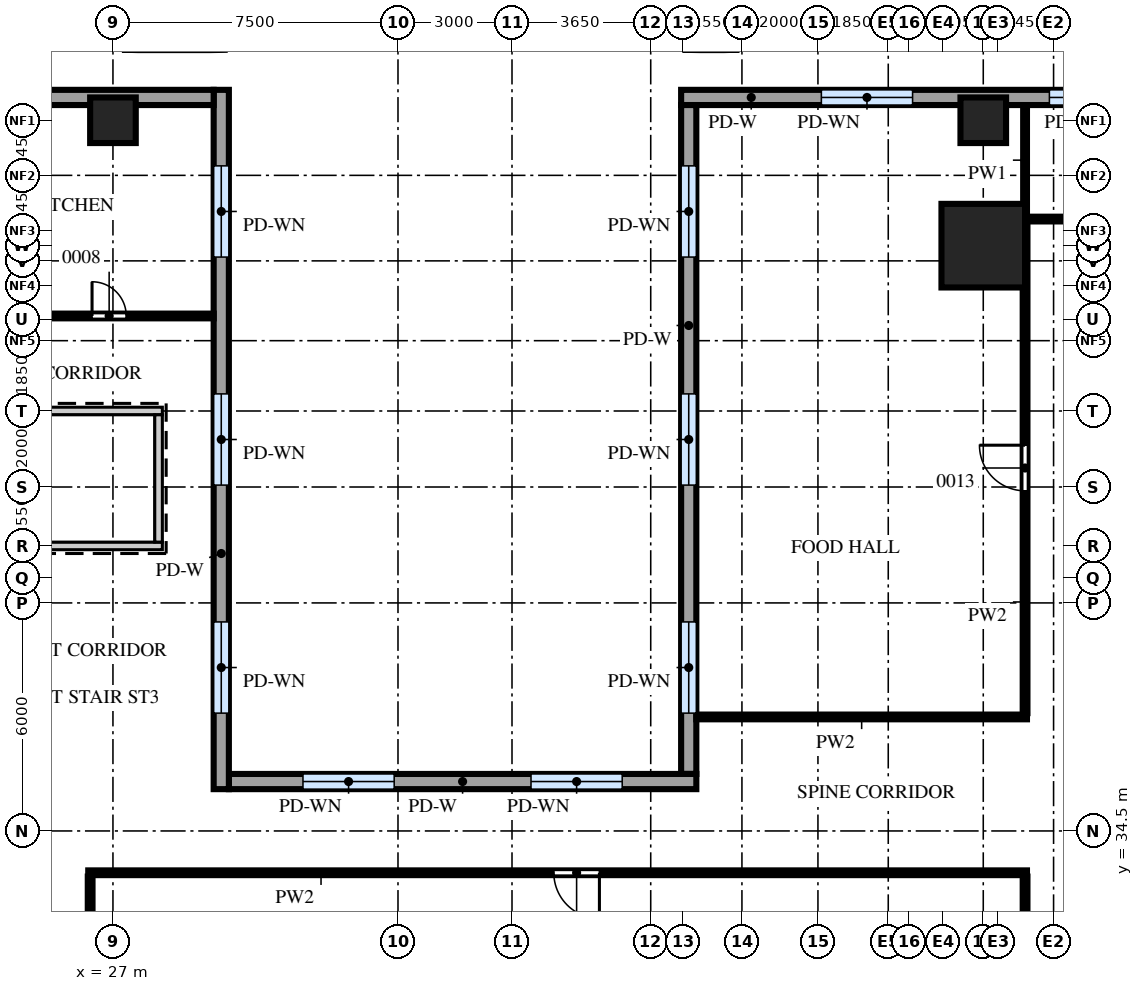
"""IFC4 building model, lengths in metres.
Left out: names, types, materials, properties, quantities, classifications, styles, units other than length and angle.
Written with IfcOpenShell. Run it as: python <this file> out.ifc"""

import sys

from ifc_helpers import new_model, si_unit, direction, frame, frame_2d, origin, origin_2d, place, context, subcontext, project, spatial, rectangle, extrude, source, transform, mapped, element, fill, save


model = new_model("IFC4")
c1 = context("Model", 3, precision=1e-05, world=origin(), true_north=direction((0.0, 1.0)))
c2 = subcontext(c1, "Body", "Model", "MODEL_VIEW")
j1 = project(units=[si_unit("LENGTHUNIT", "METRE"), si_unit("PLANEANGLEUNIT", "RADIAN")], contexts=[c1])
p1 = place(None, origin())
s1 = spatial("IfcSite", under=j1, at=p1, CompositionType="ELEMENT")
p2 = place(p1, origin())
s2 = spatial("IfcBuilding", under=s1, at=p2, CompositionType="ELEMENT")
p3 = place(p2, frame((0.0, 0.0, 13.0)))
s3 = spatial("IfcBuildingStorey", under=s2, at=p3, CompositionType="ELEMENT", Elevation=13.0)
m1 = source(origin(), c2, "Body", "SweptSolid", [
    extrude(rectangle(XDim=7.1, YDim=0.2, at=frame_2d((3.55, 0.0))), origin(), (0.0, 0.0, 1.0), 5.2),
])
p4 = place(p3, frame((21.2, 45.55, 0.0), z_axis=(0.0, 0.0, 1.0), x_axis=(1.0, 0.0, 0.0)))
e1 = element("IfcWall", 1, at=p4, inside=s3, PredefinedType="SHEAR", context=c2, shape_type="MappedRepresentation", body=[
    mapped(m1, transform((0.0, 0.0, 0.0))),
])
m2 = source(origin(), c2, "Body", "SweptSolid", [
    extrude(rectangle(XDim=1.2, YDim=2.1, at=frame_2d((0.6, 1.05))), frame((0.0, 0.11, 0.0), z_axis=(0.0, -1.0, 0.0), x_axis=(1.0, 0.0, 0.0)), (0.0, 0.0, 1.0), 0.22),
])
p5 = place(p4, frame((0.15, 0.0, 0.0)))
e2 = element("IfcOpeningElement", 2, at=p5, cuts=e1, PredefinedType="OPENING", context=c2, shape_type="MappedRepresentation", body=[
    mapped(m2, transform((0.0, 0.0, 0.0))),
])
p6 = place(p3, frame((21.2, 42.0, 0.0), z_axis=(0.0, 0.0, 1.0), x_axis=(1.0, 0.0, 0.0)))
e3 = element("IfcWall", 3, at=p6, inside=s3, PredefinedType="SHEAR", context=c2, shape_type="MappedRepresentation", body=[
    mapped(m1, transform((0.0, 0.0, 0.0))),
])
m3 = source(origin(), c2, "Body", "SweptSolid", [
    extrude(rectangle(XDim=3.35, YDim=0.2, at=frame_2d((1.675, 0.0))), origin(), (0.0, 0.0, 1.0), 5.2),
])
p7 = place(p3, frame((28.2, 42.1, 0.0), z_axis=(0.0, 0.0, 1.0), x_axis=(0.0, 1.0, 0.0)))
e4 = element("IfcWall", 4, at=p7, inside=s3, PredefinedType="SHEAR", context=c2, shape_type="MappedRepresentation", body=[
    mapped(m3, transform((0.0, 0.0, 0.0))),
])
m4 = source(origin(), c2, "Body", "SweptSolid", [
    extrude(rectangle(XDim=2.2, YDim=2.2, at=origin_2d()), origin(), (0.0, 0.0, 1.0), 5.2),
])
p8 = place(p3, frame((49.9, 49.9, 0.0), z_axis=(0.0, 0.0, 1.0), x_axis=(1.0, 0.0, 0.0)))
e5 = element("IfcColumn", 5, at=p8, inside=s3, PredefinedType="COLUMN", context=c2, shape_type="MappedRepresentation", body=[
    mapped(m4, transform((0.0, 0.0, 0.0))),
])
m5 = source(origin(), c2, "Body", "SweptSolid", [
    extrude(rectangle(XDim=1.2, YDim=1.2, at=origin_2d()), origin(), (0.0, 0.0, 1.0), 5.2),
])
for number, where, z_axis, x_axis in (
    (6, (27.0, 53.2, 0.0), (0.0, 0.0, 1.0), (1.0, 0.0, 0.0)),
    (7, (49.9, 53.2, 0.0), (0.0, 0.0, 1.0), (1.0, 0.0, 0.0)),
):
    element("IfcColumn", number, at=place(p3, frame(where, z_axis=z_axis, x_axis=x_axis)), inside=s3, PredefinedType="COLUMN", context=c2, shape_type="MappedRepresentation", body=[
        mapped(m5, transform((0.0, 0.0, 0.0))),
    ])
m6 = source(origin(), c2, "Body", "SweptSolid", [
    extrude(rectangle(XDim=27.74, YDim=0.4, at=frame_2d((13.87, 0.0))), origin(), (0.0, 0.0, 1.0), 5.2),
])
p9 = place(p3, frame((69.69, 53.8, 0.0), z_axis=(0.0, 0.0, 1.0), x_axis=(-1.0, 0.0, 0.0)))
e8 = element("IfcWall", 8, at=p9, inside=s3, PredefinedType="SOLIDWALL", context=c2, shape_type="MappedRepresentation", body=[
    mapped(m6, transform((0.0, 0.0, 0.0))),
])
m7 = source(origin(), c2, "Body", "SweptSolid", [
    extrude(rectangle(XDim=2.4, YDim=2.4, at=frame_2d((1.2, 1.2))), frame((0.0, 0.21, 0.0), z_axis=(0.0, -1.0, 0.0), x_axis=(1.0, 0.0, 0.0)), (0.0, 0.0, 1.0), 0.42),
])
p10 = place(p9, frame((3.65, 0.0, 1.0)))
e9 = element("IfcOpeningElement", 9, at=p10, cuts=e8, PredefinedType="OPENING", context=c2, shape_type="MappedRepresentation", body=[
    mapped(m7, transform((0.0, 0.0, 0.0))),
])
p11 = place(p9, frame((9.65, 0.0, 1.0)))
e10 = element("IfcOpeningElement", 10, at=p11, cuts=e8, PredefinedType="OPENING", context=c2, shape_type="MappedRepresentation", body=[
    mapped(m7, transform((0.0, 0.0, 0.0))),
])
p12 = place(p9, frame((15.65, 0.0, 1.0)))
e11 = element("IfcOpeningElement", 11, at=p12, cuts=e8, PredefinedType="OPENING", context=c2, shape_type="MappedRepresentation", body=[
    mapped(m7, transform((0.0, 0.0, 0.0))),
])
p13 = place(p9, frame((21.65, 0.0, 1.0)))
e12 = element("IfcOpeningElement", 12, at=p13, cuts=e8, PredefinedType="OPENING", context=c2, shape_type="MappedRepresentation", body=[
    mapped(m7, transform((0.0, 0.0, 0.0))),
])
m8 = source(origin(), c2, "Body", "SweptSolid", [
    extrude(rectangle(XDim=17.6, YDim=0.4, at=frame_2d((8.8, 0.0))), origin(), (0.0, 0.0, 1.0), 5.2),
])
p14 = place(p3, frame((42.15, 53.6, 0.0), z_axis=(0.0, 0.0, 1.0), x_axis=(0.0, -1.0, 0.0)))
e13 = element("IfcWall", 13, at=p14, inside=s3, PredefinedType="SOLIDWALL", context=c2, shape_type="MappedRepresentation", body=[
    mapped(m8, transform((0.0, 0.0, 0.0))),
])
p15 = place(p14, frame((1.6, 0.0, 1.0)))
e14 = element("IfcOpeningElement", 14, at=p15, cuts=e13, PredefinedType="OPENING", context=c2, shape_type="MappedRepresentation", body=[
    mapped(m7, transform((0.0, 0.0, 0.0))),
])
p16 = place(p14, frame((7.6, 0.0, 1.0)))
e15 = element("IfcOpeningElement", 15, at=p16, cuts=e13, PredefinedType="OPENING", context=c2, shape_type="MappedRepresentation", body=[
    mapped(m7, transform((0.0, 0.0, 0.0))),
])
p17 = place(p14, frame((13.6, 0.0, 1.0)))
e16 = element("IfcOpeningElement", 16, at=p17, cuts=e13, PredefinedType="OPENING", context=c2, shape_type="MappedRepresentation", body=[
    mapped(m7, transform((0.0, 0.0, 0.0))),
])
m9 = source(origin(), c2, "Body", "SweptSolid", [
    extrude(rectangle(XDim=12.3, YDim=0.4, at=frame_2d((6.15, 0.0))), origin(), (0.0, 0.0, 1.0), 5.2),
])
p18 = place(p3, frame((42.35, 35.8, 0.0), z_axis=(0.0, 0.0, 1.0), x_axis=(-1.0, 0.0, 0.0)))
e17 = element("IfcWall", 17, at=p18, inside=s3, PredefinedType="SOLIDWALL", context=c2, shape_type="MappedRepresentation", body=[
    mapped(m9, transform((0.0, 0.0, 0.0))),
])
p19 = place(p18, frame((1.95, 0.0, 1.0)))
e18 = element("IfcOpeningElement", 18, at=p19, cuts=e17, PredefinedType="OPENING", context=c2, shape_type="MappedRepresentation", body=[
    mapped(m7, transform((0.0, 0.0, 0.0))),
])
p20 = place(p18, frame((7.95, 0.0, 1.0)))
e19 = element("IfcOpeningElement", 19, at=p20, cuts=e17, PredefinedType="OPENING", context=c2, shape_type="MappedRepresentation", body=[
    mapped(m7, transform((0.0, 0.0, 0.0))),
])
m10 = source(origin(), c2, "Body", "SweptSolid", [
    extrude(rectangle(XDim=18.4, YDim=0.4, at=frame_2d((9.2, 0.0))), origin(), (0.0, 0.0, 1.0), 5.2),
])
p21 = place(p3, frame((29.85, 35.6, 0.0), z_axis=(0.0, 0.0, 1.0), x_axis=(0.0, 1.0, 0.0)))
e20 = element("IfcWall", 20, at=p21, inside=s3, PredefinedType="SOLIDWALL", context=c2, shape_type="MappedRepresentation", body=[
    mapped(m10, transform((0.0, 0.0, 0.0))),
])
p22 = place(p21, frame((2.0, 0.0, 1.0)))
e21 = element("IfcOpeningElement", 21, at=p22, cuts=e20, PredefinedType="OPENING", context=c2, shape_type="MappedRepresentation", body=[
    mapped(m7, transform((0.0, 0.0, 0.0))),
])
p23 = place(p21, frame((8.0, 0.0, 1.0)))
e22 = element("IfcOpeningElement", 22, at=p23, cuts=e20, PredefinedType="OPENING", context=c2, shape_type="MappedRepresentation", body=[
    mapped(m7, transform((0.0, 0.0, 0.0))),
])
p24 = place(p21, frame((14.0, 0.0, 1.0)))
e23 = element("IfcOpeningElement", 23, at=p24, cuts=e20, PredefinedType="OPENING", context=c2, shape_type="MappedRepresentation", body=[
    mapped(m7, transform((0.0, 0.0, 0.0))),
])
m11 = source(origin(), c2, "Body", "SweptSolid", [
    extrude(rectangle(XDim=31.44, YDim=0.4, at=frame_2d((15.72, 0.0))), origin(), (0.0, 0.0, 1.0), 5.2),
])
p25 = place(p3, frame((29.65, 53.8, 0.0), z_axis=(0.0, 0.0, 1.0), x_axis=(-1.0, 0.0, 0.0)))
e24 = element("IfcWall", 24, at=p25, inside=s3, PredefinedType="SOLIDWALL", context=c2, shape_type="MappedRepresentation", body=[
    mapped(m11, transform((0.0, 0.0, 0.0))),
])
p26 = place(p25, frame((20.5, 0.0, 1.0)))
e25 = element("IfcOpeningElement", 25, at=p26, cuts=e24, PredefinedType="OPENING", context=c2, shape_type="MappedRepresentation", body=[
    mapped(m7, transform((0.0, 0.0, 0.0))),
])
p27 = place(p25, frame((26.5, 0.0, 1.0)))
e26 = element("IfcOpeningElement", 26, at=p27, cuts=e24, PredefinedType="OPENING", context=c2, shape_type="MappedRepresentation", body=[
    mapped(m7, transform((0.0, 0.0, 0.0))),
])
m12 = source(origin(), c2, "Body", "SweptSolid", [
    extrude(rectangle(XDim=29.7, YDim=0.125, at=frame_2d((14.85, 0.0))), origin(), (0.0, 0.0, 1.0), 5.2),
])
p28 = place(p3, frame((51.0, 3.6, 0.0), z_axis=(0.0, 0.0, 1.0), x_axis=(0.0, 1.0, 0.0)))
e27 = element("IfcWall", 27, at=p28, inside=s3, PredefinedType="PARTITIONING", context=c2, shape_type="MappedRepresentation", body=[
    mapped(m12, transform((0.0, 0.0, 0.0))),
])
m13 = source(origin(), c2, "Body", "SweptSolid", [
    extrude(rectangle(XDim=1.2, YDim=2.1, at=frame_2d((0.6, 1.05))), frame((0.0, 0.073, 0.0), z_axis=(0.0, -1.0, 0.0), x_axis=(1.0, 0.0, 0.0)), (0.0, 0.0, 1.0), 0.145),
])
p29 = place(p28, frame((6.55, 0.0, 0.0)))
e28 = element("IfcOpeningElement", 28, at=p29, cuts=e27, PredefinedType="OPENING", context=c2, shape_type="MappedRepresentation", body=[
    mapped(m13, transform((0.0, 0.0, 0.0))),
])
m14 = source(origin(), c2, "Body", "SweptSolid", [
    extrude(rectangle(XDim=27.15, YDim=0.125, at=frame_2d((13.575, 0.0))), origin(), (0.0, 0.0, 1.0), 5.2),
])
p30 = place(p3, frame((26.4, 6.15, 0.0), z_axis=(0.0, 0.0, 1.0), x_axis=(0.0, 1.0, 0.0)))
e29 = element("IfcWall", 29, at=p30, inside=s3, PredefinedType="PARTITIONING", context=c2, shape_type="MappedRepresentation", body=[
    mapped(m14, transform((0.0, 0.0, 0.0))),
])
m15 = source(origin(), c2, "Body", "SweptSolid", [
    extrude(rectangle(XDim=0.9, YDim=2.1, at=frame_2d((0.45, 1.05))), frame((0.0, 0.073, 0.0), z_axis=(0.0, -1.0, 0.0), x_axis=(1.0, 0.0, 0.0)), (0.0, 0.0, 1.0), 0.145),
])
p31 = place(p30, frame((5.3, 0.0, 0.0)))
e30 = element("IfcOpeningElement", 30, at=p31, cuts=e29, PredefinedType="OPENING", context=c2, shape_type="MappedRepresentation", body=[
    mapped(m15, transform((0.0, 0.0, 0.0))),
])
m16 = source(origin(), c2, "Body", "SweptSolid", [
    extrude(rectangle(XDim=24.7, YDim=0.125, at=frame_2d((12.35, 0.0))), origin(), (0.0, 0.0, 1.0), 5.2),
])
p32 = place(p3, frame((26.35, 33.4, 0.0), z_axis=(0.0, 0.0, 1.0), x_axis=(1.0, 0.0, 0.0)))
e31 = element("IfcWall", 31, at=p32, inside=s3, PredefinedType="PARTITIONING", context=c2, shape_type="MappedRepresentation", body=[
    mapped(m16, transform((0.0, 0.0, 0.0))),
])
p33 = place(p32, frame((12.25, 0.0, 0.0)))
e32 = element("IfcOpeningElement", 32, at=p33, cuts=e31, PredefinedType="OPENING", context=c2, shape_type="MappedRepresentation", body=[
    mapped(m13, transform((0.0, 0.0, 0.0))),
])
m17 = source(origin(), c2, "Body", "SweptSolid", [
    extrude(rectangle(XDim=8.7, YDim=0.125, at=frame_2d((4.35, 0.0))), origin(), (0.0, 0.0, 1.0), 5.2),
])
p34 = place(p3, frame((42.35, 37.5, 0.0), z_axis=(0.0, 0.0, 1.0), x_axis=(1.0, 0.0, 0.0)))
e33 = element("IfcWall", 33, at=p34, inside=s3, PredefinedType="PARTITIONING", context=c2, shape_type="MappedRepresentation", body=[
    mapped(m17, transform((0.0, 0.0, 0.0))),
])
m18 = source(origin(), c2, "Body", "SweptSolid", [
    extrude(rectangle(XDim=12.9, YDim=0.125, at=frame_2d((6.45, 0.0))), origin(), (0.0, 0.0, 1.0), 5.2),
])
p35 = place(p3, frame((51.0, 37.6, 0.0), z_axis=(0.0, 0.0, 1.0), x_axis=(0.0, 1.0, 0.0)))
e34 = element("IfcWall", 34, at=p35, inside=s3, PredefinedType="PARTITIONING", context=c2, shape_type="MappedRepresentation", body=[
    mapped(m18, transform((0.0, 0.0, 0.0))),
])
p36 = place(p35, frame((5.85, 0.0, 0.0)))
e35 = element("IfcOpeningElement", 35, at=p36, cuts=e34, PredefinedType="OPENING", context=c2, shape_type="MappedRepresentation", body=[
    mapped(m13, transform((0.0, 0.0, 0.0))),
])
m19 = source(origin(), c2, "Body", "SweptSolid", [
    extrude(rectangle(XDim=25.5, YDim=0.125, at=frame_2d((12.75, 0.0))), origin(), (0.0, 0.0, 1.0), 5.2),
])
p37 = place(p3, frame((4.15, 48.05, 0.0), z_axis=(0.0, 0.0, 1.0), x_axis=(1.0, 0.0, 0.0)))
e36 = element("IfcWall", 36, at=p37, inside=s3, PredefinedType="PARTITIONING", context=c2, shape_type="MappedRepresentation", body=[
    mapped(m19, transform((0.0, 0.0, 0.0))),
])
p38 = place(p37, frame((3.5, 0.0, 0.0)))
e37 = element("IfcOpeningElement", 37, at=p38, cuts=e36, PredefinedType="OPENING", context=c2, shape_type="MappedRepresentation", body=[
    mapped(m15, transform((0.0, 0.0, 0.0))),
])
p39 = place(p37, frame((11.0, 0.0, 0.0)))
e38 = element("IfcOpeningElement", 38, at=p39, cuts=e36, PredefinedType="OPENING", context=c2, shape_type="MappedRepresentation", body=[
    mapped(m15, transform((0.0, 0.0, 0.0))),
])
m20 = source(origin(), c2, "Body", "SweptSolid", [
    extrude(rectangle(XDim=1.0, YDim=2.1, at=frame_2d((0.5, 1.05))), frame((0.0, 0.073, 0.0), z_axis=(0.0, -1.0, 0.0), x_axis=(1.0, 0.0, 0.0)), (0.0, 0.0, 1.0), 0.145),
])
p40 = place(p37, frame((17.1, 0.0, 0.0)))
e39 = element("IfcOpeningElement", 39, at=p40, cuts=e36, PredefinedType="OPENING", context=c2, shape_type="MappedRepresentation", body=[
    mapped(m20, transform((0.0, 0.0, 0.0))),
])
p41 = place(p37, frame((22.3, 0.0, 0.0)))
e40 = element("IfcOpeningElement", 40, at=p41, cuts=e36, PredefinedType="OPENING", context=c2, shape_type="MappedRepresentation", body=[
    mapped(m15, transform((0.0, 0.0, 0.0))),
])
m21 = source(origin(), c2, "Body", "SweptSolid", [
    extrude(rectangle(XDim=16.1, YDim=0.125, at=frame_2d((8.05, 0.0))), origin(), (0.0, 0.0, 1.0), 5.2),
])
p42 = place(p3, frame((50.95, 50.6, 0.0), z_axis=(0.0, 0.0, 1.0), x_axis=(1.0, 0.0, 0.0)))
e41 = element("IfcWall", 41, at=p42, inside=s3, PredefinedType="PARTITIONING", context=c2, shape_type="MappedRepresentation", body=[
    mapped(m21, transform((0.0, 0.0, 0.0))),
])
p43 = place(p42, frame((7.45, 0.0, 0.0)))
e42 = element("IfcOpeningElement", 42, at=p43, cuts=e41, PredefinedType="OPENING", context=c2, shape_type="MappedRepresentation", body=[
    mapped(m13, transform((0.0, 0.0, 0.0))),
])
m22 = source(origin(), c2, "Body", "SweptSolid", [
    extrude(rectangle(XDim=2.9, YDim=0.1, at=frame_2d((1.45, 0.0))), origin(), (0.0, 0.0, 1.0), 5.2),
])
p44 = place(p3, frame((51.0, 50.7, 0.0), z_axis=(0.0, 0.0, 1.0), x_axis=(0.0, 1.0, 0.0)))
e43 = element("IfcWall", 43, at=p44, inside=s3, PredefinedType="PARTITIONING", context=c2, shape_type="MappedRepresentation", body=[
    mapped(m22, transform((0.0, 0.0, 0.0))),
])
m23 = source(origin(), c2, "Body", "SweptSolid", [
    extrude(rectangle(XDim=2.4, YDim=2.4, at=frame_2d((1.2, 1.2))), frame((0.0, 0.03, 0.0), z_axis=(0.0, -1.0, 0.0), x_axis=(1.0, 0.0, 0.0)), (0.0, 0.0, 1.0), 0.06),
])
p45 = place(p12, origin())
e44 = element("IfcWindow", 44, at=p45, inside=s3, PartitioningType="SINGLE_PANEL", PredefinedType="WINDOW", context=c2, shape_type="MappedRepresentation", body=[
    mapped(m23, transform((0.0, 0.0, 0.0))),
])
fill(e11, e44)
p46 = place(p13, origin())
e45 = element("IfcWindow", 45, at=p46, inside=s3, PartitioningType="SINGLE_PANEL", PredefinedType="WINDOW", context=c2, shape_type="MappedRepresentation", body=[
    mapped(m23, transform((0.0, 0.0, 0.0))),
])
fill(e12, e45)
p47 = place(p15, origin())
e46 = element("IfcWindow", 46, at=p47, inside=s3, PartitioningType="SINGLE_PANEL", PredefinedType="WINDOW", context=c2, shape_type="MappedRepresentation", body=[
    mapped(m23, transform((0.0, 0.0, 0.0))),
])
fill(e14, e46)
p48 = place(p16, origin())
e47 = element("IfcWindow", 47, at=p48, inside=s3, PartitioningType="SINGLE_PANEL", PredefinedType="WINDOW", context=c2, shape_type="MappedRepresentation", body=[
    mapped(m23, transform((0.0, 0.0, 0.0))),
])
fill(e15, e47)
p49 = place(p17, origin())
e48 = element("IfcWindow", 48, at=p49, inside=s3, PartitioningType="SINGLE_PANEL", PredefinedType="WINDOW", context=c2, shape_type="MappedRepresentation", body=[
    mapped(m23, transform((0.0, 0.0, 0.0))),
])
fill(e16, e48)
p50 = place(p19, origin())
e49 = element("IfcWindow", 49, at=p50, inside=s3, PartitioningType="SINGLE_PANEL", PredefinedType="WINDOW", context=c2, shape_type="MappedRepresentation", body=[
    mapped(m23, transform((0.0, 0.0, 0.0))),
])
fill(e18, e49)
p51 = place(p20, origin())
e50 = element("IfcWindow", 50, at=p51, inside=s3, PartitioningType="SINGLE_PANEL", PredefinedType="WINDOW", context=c2, shape_type="MappedRepresentation", body=[
    mapped(m23, transform((0.0, 0.0, 0.0))),
])
fill(e19, e50)
p52 = place(p22, origin())
e51 = element("IfcWindow", 51, at=p52, inside=s3, PartitioningType="SINGLE_PANEL", PredefinedType="WINDOW", context=c2, shape_type="MappedRepresentation", body=[
    mapped(m23, transform((0.0, 0.0, 0.0))),
])
fill(e21, e51)
p53 = place(p23, origin())
e52 = element("IfcWindow", 52, at=p53, inside=s3, PartitioningType="SINGLE_PANEL", PredefinedType="WINDOW", context=c2, shape_type="MappedRepresentation", body=[
    mapped(m23, transform((0.0, 0.0, 0.0))),
])
fill(e22, e52)
p54 = place(p24, origin())
e53 = element("IfcWindow", 53, at=p54, inside=s3, PartitioningType="SINGLE_PANEL", PredefinedType="WINDOW", context=c2, shape_type="MappedRepresentation", body=[
    mapped(m23, transform((0.0, 0.0, 0.0))),
])
fill(e23, e53)
m24 = source(origin(), c2, "Body", "SweptSolid", [
    extrude(rectangle(XDim=1.2, YDim=2.1, at=frame_2d((0.6, 1.05))), frame((0.0, 0.025, 0.0), z_axis=(0.0, -1.0, 0.0), x_axis=(1.0, 0.0, 0.0)), (0.0, 0.0, 1.0), 0.05),
])
p55 = place(p33, origin())
e54 = element("IfcDoor", 54, at=p55, inside=s3, OperationType="SINGLE_SWING_RIGHT", PredefinedType="DOOR", context=c2, shape_type="MappedRepresentation", body=[
    mapped(m24, transform((0.0, 0.0, 0.0))),
])
fill(e32, e54)
p56 = place(p36, origin())
e55 = element("IfcDoor", 55, at=p56, inside=s3, OperationType="SINGLE_SWING_LEFT", PredefinedType="DOOR", context=c2, shape_type="MappedRepresentation", body=[
    mapped(m24, transform((0.0, 0.0, 0.0))),
])
fill(e35, e55)
m25 = source(origin(), c2, "Body", "SweptSolid", [
    extrude(rectangle(XDim=0.9, YDim=2.1, at=frame_2d((0.45, 1.05))), frame((0.0, 0.025, 0.0), z_axis=(0.0, -1.0, 0.0), x_axis=(1.0, 0.0, 0.0)), (0.0, 0.0, 1.0), 0.05),
])
p57 = place(p41, origin())
e56 = element("IfcDoor", 56, at=p57, inside=s3, OperationType="SINGLE_SWING_RIGHT", PredefinedType="DOOR", context=c2, shape_type="MappedRepresentation", body=[
    mapped(m25, transform((0.0, 0.0, 0.0))),
])
fill(e40, e56)
save(model, sys.argv[1])
